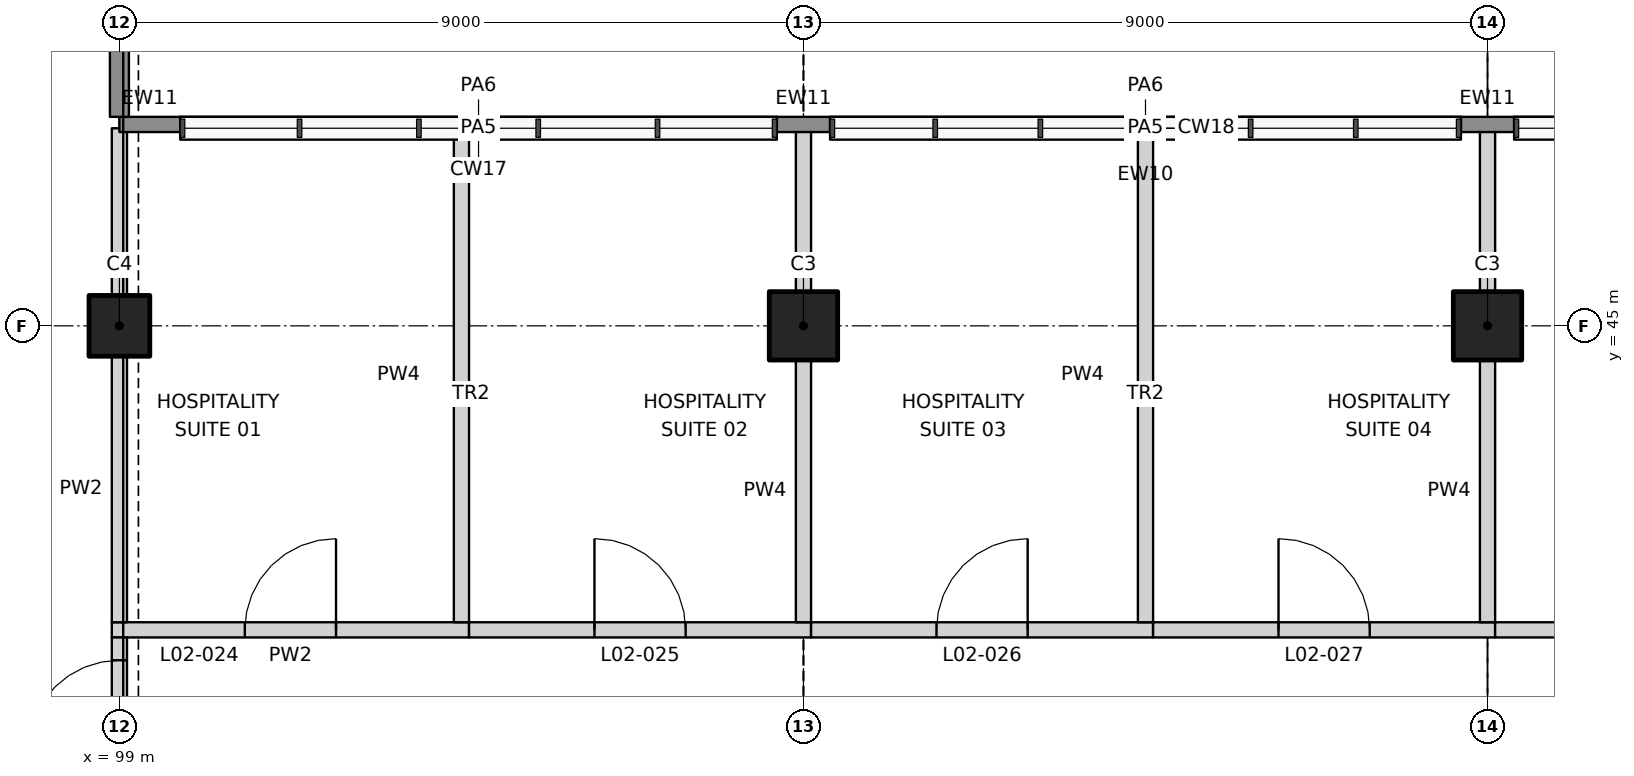
"""IFC4 building model, lengths in metres.
Left out: names, types, materials, properties, quantities, classifications, styles, units other than length and angle.
Written with IfcOpenShell. Run it as: python <this file> out.ifc"""

import sys

from ifc_helpers import new_model, si_unit, direction, frame, frame_2d, origin, origin_2d, place, context, subcontext, project, spatial, polyline, rectangle, outline, extrude, element, fill, save


model = new_model("IFC4")
c1 = context("Model", 3, precision=1e-05, world=origin(), true_north=direction((0.0, 1.0)))
c2 = subcontext(c1, "Body", "Model", "MODEL_VIEW")
j1 = project(units=[si_unit("LENGTHUNIT", "METRE"), si_unit("PLANEANGLEUNIT", "RADIAN")], contexts=[c1])
p1 = place(None, origin())
s1 = spatial("IfcSite", under=j1, at=p1, CompositionType="ELEMENT")
p2 = place(p1, origin())
s2 = spatial("IfcBuilding", under=s1, at=p2, CompositionType="ELEMENT")
p3 = place(p2, frame((0.0, 0.0, 11.5)))
s3 = spatial("IfcBuildingStorey", under=s2, at=p3, CompositionType="ELEMENT", Elevation=11.5)
p4 = place(p3, frame((99.0, 45.0, 0.0), z_axis=(0.0, 0.0, 1.0), x_axis=(1.0, 0.0, 0.0)))
e1 = element("IfcColumn", 1, at=p4, inside=s3, PredefinedType="COLUMN", context=c2, shape_type="SweptSolid", body=[
    extrude(rectangle(XDim=0.8, YDim=0.8, at=origin_2d()), origin(), (0.0, 0.0, 1.0), 10.5),
])
for number, where, z_axis, x_axis in (
    (2, (108.0, 45.0, 0.0), (0.0, 0.0, 1.0), (1.0, 0.0, 0.0)),
    (3, (117.0, 45.0, 0.0), (0.0, 0.0, 1.0), (1.0, 0.0, 0.0)),
):
    element("IfcColumn", number, at=place(p3, frame(where, z_axis=z_axis, x_axis=x_axis)), inside=s3, PredefinedType="COLUMN", context=c2, shape_type="SweptSolid", body=[
        extrude(rectangle(XDim=0.9, YDim=0.9, at=origin_2d()), origin(), (0.0, 0.0, 1.0), 4.506),
    ])
p5 = place(p3, frame((98.9, 41.0, 0.0), z_axis=(0.0, 0.0, 1.0), x_axis=(1.0, 0.0, 0.0)))
e4 = element("IfcWall", 4, at=p5, inside=s3, PredefinedType="PARTITIONING", context=c2, shape_type="SweptSolid", body=[
    extrude(outline(polyline([(0.0, 0.0), (4.7, 0.0), (4.7, 8.258), (0.47, 8.258), (0.0, 10.5), (0.0, 0.0)])), frame((0.0, 0.1, 0.0), z_axis=(0.0, -1.0, 0.0), x_axis=(1.0, 0.0, 0.0)), (0.0, 0.0, 1.0), 0.2),
])
p6 = place(p5, frame((1.75, 0.0, 0.0)))
e5 = element("IfcOpeningElement", 5, at=p6, cuts=e4, PredefinedType="OPENING", context=c2, shape_type="SweptSolid", body=[
    extrude(rectangle(XDim=1.2, YDim=2.1, at=frame_2d((0.6, 1.05))), frame((0.0, 0.11, 0.0), z_axis=(0.0, -1.0, 0.0), x_axis=(1.0, 0.0, 0.0)), (0.0, 0.0, 1.0), 0.22),
])
p7 = place(p3, frame((103.6, 41.0, 0.0), z_axis=(0.0, 0.0, 1.0), x_axis=(1.0, 0.0, 0.0)))
e6 = element("IfcWall", 6, at=p7, inside=s3, PredefinedType="PARTITIONING", context=c2, shape_type="SweptSolid", body=[
    extrude(rectangle(XDim=4.5, YDim=0.2, at=frame_2d((2.25, 0.0))), origin(), (0.0, 0.0, 1.0), 8.258),
])
p8 = place(p7, frame((1.65, 0.0, 0.0)))
e7 = element("IfcOpeningElement", 7, at=p8, cuts=e6, PredefinedType="OPENING", context=c2, shape_type="SweptSolid", body=[
    extrude(rectangle(XDim=1.2, YDim=2.1, at=frame_2d((0.6, 1.05))), frame((0.0, 0.11, 0.0), z_axis=(0.0, -1.0, 0.0), x_axis=(1.0, 0.0, 0.0)), (0.0, 0.0, 1.0), 0.22),
])
p9 = place(p3, frame((108.1, 41.0, 0.0), z_axis=(0.0, 0.0, 1.0), x_axis=(1.0, 0.0, 0.0)))
e8 = element("IfcWall", 8, at=p9, inside=s3, PredefinedType="PARTITIONING", context=c2, shape_type="SweptSolid", body=[
    extrude(rectangle(XDim=4.5, YDim=0.2, at=frame_2d((2.25, 0.0))), origin(), (0.0, 0.0, 1.0), 8.258),
])
p10 = place(p9, frame((1.65, 0.0, 0.0)))
e9 = element("IfcOpeningElement", 9, at=p10, cuts=e8, PredefinedType="OPENING", context=c2, shape_type="SweptSolid", body=[
    extrude(rectangle(XDim=1.2, YDim=2.1, at=frame_2d((0.6, 1.05))), frame((0.0, 0.11, 0.0), z_axis=(0.0, -1.0, 0.0), x_axis=(1.0, 0.0, 0.0)), (0.0, 0.0, 1.0), 0.22),
])
p11 = place(p3, frame((112.6, 41.0, 0.0), z_axis=(0.0, 0.0, 1.0), x_axis=(1.0, 0.0, 0.0)))
e10 = element("IfcWall", 10, at=p11, inside=s3, PredefinedType="PARTITIONING", context=c2, shape_type="SweptSolid", body=[
    extrude(rectangle(XDim=4.5, YDim=0.2, at=frame_2d((2.25, 0.0))), origin(), (0.0, 0.0, 1.0), 8.258),
])
p12 = place(p11, frame((1.65, 0.0, 0.0)))
e11 = element("IfcOpeningElement", 11, at=p12, cuts=e10, PredefinedType="OPENING", context=c2, shape_type="SweptSolid", body=[
    extrude(rectangle(XDim=1.2, YDim=2.1, at=frame_2d((0.6, 1.05))), frame((0.0, 0.11, 0.0), z_axis=(0.0, -1.0, 0.0), x_axis=(1.0, 0.0, 0.0)), (0.0, 0.0, 1.0), 0.22),
])
p13 = place(p3, frame((117.1, 41.0, 0.0), z_axis=(0.0, 0.0, 1.0), x_axis=(1.0, 0.0, 0.0)))
e12 = element("IfcWall", 12, at=p13, inside=s3, PredefinedType="PARTITIONING", context=c2, shape_type="SweptSolid", body=[
    extrude(rectangle(XDim=4.5, YDim=0.2, at=frame_2d((2.25, 0.0))), origin(), (0.0, 0.0, 1.0), 8.258),
])
p14 = place(p13, frame((1.65, 0.0, 0.0)))
e13 = element("IfcOpeningElement", 13, at=p14, cuts=e12, PredefinedType="OPENING", context=c2, shape_type="SweptSolid", body=[
    extrude(rectangle(XDim=1.2, YDim=2.1, at=frame_2d((0.6, 1.05))), frame((0.0, 0.11, 0.0), z_axis=(0.0, -1.0, 0.0), x_axis=(1.0, 0.0, 0.0)), (0.0, 0.0, 1.0), 0.22),
])
p15 = place(p3, frame((99.0, 39.1, 0.0), z_axis=(0.0, 0.0, 1.0), x_axis=(0.0, 1.0, 0.0)))
e14 = element("IfcWall", 14, at=p15, inside=s3, PredefinedType="PARTITIONING", context=c2, shape_type="SweptSolid", body=[
    extrude(rectangle(XDim=1.8, YDim=0.2, at=frame_2d((0.9, 0.0))), origin(), (0.0, 0.0, 1.0), 4.439),
])
p16 = place(p15, frame((0.3, 0.0, 0.0)))
e15 = element("IfcOpeningElement", 15, at=p16, cuts=e14, PredefinedType="OPENING", context=c2, shape_type="SweptSolid", body=[
    extrude(rectangle(XDim=1.2, YDim=2.1, at=frame_2d((0.6, 1.05))), frame((0.0, 0.11, 0.0), z_axis=(0.0, -1.0, 0.0), x_axis=(1.0, 0.0, 0.0)), (0.0, 0.0, 1.0), 0.22),
])
p17 = place(p3, frame((99.0, 41.1, 0.0), z_axis=(0.0, 0.0, 1.0), x_axis=(0.0, 1.0, 0.0)))
e16 = element("IfcWall", 16, at=p17, inside=s3, PredefinedType="PARTITIONING", context=c2, shape_type="SweptSolid", body=[
    extrude(rectangle(XDim=3.5, YDim=0.2, at=frame_2d((1.75, 0.0))), origin(), (0.0, 0.0, 1.0), 4.439),
])
p18 = place(p3, frame((99.0, 45.4, 0.0), z_axis=(0.0, 0.0, 1.0), x_axis=(0.0, 1.0, 0.0)))
e17 = element("IfcWall", 17, at=p18, inside=s3, PredefinedType="PARTITIONING", context=c2, shape_type="SweptSolid", body=[
    extrude(rectangle(XDim=2.2, YDim=0.2, at=frame_2d((1.1, 0.0))), origin(), (0.0, 0.0, 1.0), 2.877),
])
p19 = place(p3, frame((103.5, 41.1, 0.0), z_axis=(0.0, 0.0, 1.0), x_axis=(0.0, 1.0, 0.0)))
e18 = element("IfcWall", 18, at=p19, inside=s3, PredefinedType="PARTITIONING", context=c2, shape_type="SweptSolid", body=[
    extrude(outline(polyline([(0.0, 0.0), (6.5, 0.0), (6.5, 4.133), (0.0, 8.195), (0.0, 0.0)])), frame((0.0, 0.1, 0.0), z_axis=(0.0, -1.0, 0.0), x_axis=(1.0, 0.0, 0.0)), (0.0, 0.0, 1.0), 0.2),
])
p20 = place(p3, frame((108.0, 41.1, 0.0), z_axis=(0.0, 0.0, 1.0), x_axis=(0.0, 1.0, 0.0)))
e19 = element("IfcWall", 19, at=p20, inside=s3, PredefinedType="PARTITIONING", context=c2, shape_type="SweptSolid", body=[
    extrude(rectangle(XDim=3.45, YDim=0.2, at=frame_2d((1.725, 0.0))), origin(), (0.0, 0.0, 1.0), 4.439),
])
p21 = place(p3, frame((108.0, 45.45, 0.0), z_axis=(0.0, 0.0, 1.0), x_axis=(0.0, 1.0, 0.0)))
e20 = element("IfcWall", 20, at=p21, inside=s3, PredefinedType="PARTITIONING", context=c2, shape_type="SweptSolid", body=[
    extrude(outline(polyline([(0.0, 0.0), (2.15, 0.0), (2.15, 2.833), (2.079, 2.877), (0.0, 2.877), (0.0, 0.0)])), frame((0.0, 0.1, 0.0), z_axis=(0.0, -1.0, 0.0), x_axis=(1.0, 0.0, 0.0)), (0.0, 0.0, 1.0), 0.2),
])
p22 = place(p3, frame((112.5, 41.1, 0.0), z_axis=(0.0, 0.0, 1.0), x_axis=(0.0, 1.0, 0.0)))
e21 = element("IfcWall", 21, at=p22, inside=s3, PredefinedType="PARTITIONING", context=c2, shape_type="SweptSolid", body=[
    extrude(outline(polyline([(0.0, 0.0), (6.5, 0.0), (6.5, 4.133), (0.0, 8.195), (0.0, 0.0)])), frame((0.0, 0.1, 0.0), z_axis=(0.0, -1.0, 0.0), x_axis=(1.0, 0.0, 0.0)), (0.0, 0.0, 1.0), 0.2),
])
p23 = place(p3, frame((117.0, 41.1, 0.0), z_axis=(0.0, 0.0, 1.0), x_axis=(0.0, 1.0, 0.0)))
e22 = element("IfcWall", 22, at=p23, inside=s3, PredefinedType="PARTITIONING", context=c2, shape_type="SweptSolid", body=[
    extrude(rectangle(XDim=3.45, YDim=0.2, at=frame_2d((1.725, 0.0))), origin(), (0.0, 0.0, 1.0), 4.439),
])
p24 = place(p3, frame((117.0, 45.45, 0.0), z_axis=(0.0, 0.0, 1.0), x_axis=(0.0, 1.0, 0.0)))
e23 = element("IfcWall", 23, at=p24, inside=s3, PredefinedType="PARTITIONING", context=c2, shape_type="SweptSolid", body=[
    extrude(outline(polyline([(0.0, 0.0), (2.15, 0.0), (2.15, 2.833), (2.079, 2.877), (0.0, 2.877), (0.0, 0.0)])), frame((0.0, 0.1, 0.0), z_axis=(0.0, -1.0, 0.0), x_axis=(1.0, 0.0, 0.0)), (0.0, 0.0, 1.0), 0.2),
])
p25 = place(p3, frame((99.8, 47.65, 0.0), z_axis=(0.0, 0.0, 1.0), x_axis=(1.0, 0.0, 0.0)))
e24 = element("IfcWall", 24, at=p25, inside=s3, PredefinedType="SOLIDWALL", context=c2, shape_type="SweptSolid", body=[
    extrude(rectangle(XDim=7.85, YDim=0.2, at=frame_2d((3.925, 0.0))), origin(), (0.0, 0.0, 1.0), 1.1),
])
p26 = place(p3, frame((108.35, 47.65, 0.0), z_axis=(0.0, 0.0, 1.0), x_axis=(1.0, 0.0, 0.0)))
e25 = element("IfcWall", 25, at=p26, inside=s3, PredefinedType="SOLIDWALL", context=c2, shape_type="SweptSolid", body=[
    extrude(rectangle(XDim=8.3, YDim=0.2, at=frame_2d((4.15, 0.0))), origin(), (0.0, 0.0, 1.0), 1.1),
])
p27 = place(p3, frame((117.35, 47.65, 0.0), z_axis=(0.0, 0.0, 1.0), x_axis=(1.0, 0.0, 0.0)))
e26 = element("IfcWall", 26, at=p27, inside=s3, PredefinedType="SOLIDWALL", context=c2, shape_type="SweptSolid", body=[
    extrude(rectangle(XDim=6.85, YDim=0.2, at=frame_2d((3.425, 0.0))), origin(), (0.0, 0.0, 1.0), 1.1),
])
p28 = place(p3, frame((99.0, 47.65, 0.0), z_axis=(0.0, 0.0, 1.0), x_axis=(1.0, 0.0, 0.0)))
e27 = element("IfcWall", 27, at=p28, inside=s3, PredefinedType="SOLIDWALL", context=c2, shape_type="SweptSolid", body=[
    extrude(rectangle(XDim=0.8, YDim=0.2, at=frame_2d((0.4, 0.0))), origin(), (0.0, 0.0, 1.0), 4.034),
])
for number, where, z_axis, x_axis in (
    (28, (107.65, 47.65, 0.0), (0.0, 0.0, 1.0), (1.0, 0.0, 0.0)),
    (29, (116.65, 47.65, 0.0), (0.0, 0.0, 1.0), (1.0, 0.0, 0.0)),
):
    element("IfcWall", number, at=place(p3, frame(where, z_axis=z_axis, x_axis=x_axis)), inside=s3, PredefinedType="SOLIDWALL", context=c2, shape_type="SweptSolid", body=[
        extrude(rectangle(XDim=0.7, YDim=0.2, at=frame_2d((0.35, 0.0))), origin(), (0.0, 0.0, 1.0), 4.034),
    ])
p29 = place(p3, frame((99.0, 47.75, 0.0), z_axis=(0.0, 0.0, 1.0), x_axis=(0.0, 1.0, 0.0)))
e30 = element("IfcWall", 30, at=p29, inside=s3, PredefinedType="SOLIDWALL", context=c2, shape_type="SweptSolid", body=[
    extrude(rectangle(XDim=2.75, YDim=0.25, at=frame_2d((1.375, 0.0))), origin(), (0.0, 0.0, 1.0), 1.217),
])
p30 = place(p6, origin())
e31 = element("IfcDoor", 31, at=p30, inside=s3, OperationType="SINGLE_SWING_RIGHT", PredefinedType="DOOR", context=c2, shape_type="SweptSolid", body=[
    extrude(rectangle(XDim=1.2, YDim=2.1, at=frame_2d((0.6, 1.05))), frame((0.0, 0.025, 0.0), z_axis=(0.0, -1.0, 0.0), x_axis=(1.0, 0.0, 0.0)), (0.0, 0.0, 1.0), 0.05),
])
fill(e5, e31)
p31 = place(p8, origin())
e32 = element("IfcDoor", 32, at=p31, inside=s3, OperationType="SINGLE_SWING_LEFT", PredefinedType="DOOR", context=c2, shape_type="SweptSolid", body=[
    extrude(rectangle(XDim=1.2, YDim=2.1, at=frame_2d((0.6, 1.05))), frame((0.0, 0.025, 0.0), z_axis=(0.0, -1.0, 0.0), x_axis=(1.0, 0.0, 0.0)), (0.0, 0.0, 1.0), 0.05),
])
fill(e7, e32)
p32 = place(p10, origin())
e33 = element("IfcDoor", 33, at=p32, inside=s3, OperationType="SINGLE_SWING_RIGHT", PredefinedType="DOOR", context=c2, shape_type="SweptSolid", body=[
    extrude(rectangle(XDim=1.2, YDim=2.1, at=frame_2d((0.6, 1.05))), frame((0.0, 0.025, 0.0), z_axis=(0.0, -1.0, 0.0), x_axis=(1.0, 0.0, 0.0)), (0.0, 0.0, 1.0), 0.05),
])
fill(e9, e33)
p33 = place(p12, origin())
e34 = element("IfcDoor", 34, at=p33, inside=s3, OperationType="SINGLE_SWING_LEFT", PredefinedType="DOOR", context=c2, shape_type="SweptSolid", body=[
    extrude(rectangle(XDim=1.2, YDim=2.1, at=frame_2d((0.6, 1.05))), frame((0.0, 0.025, 0.0), z_axis=(0.0, -1.0, 0.0), x_axis=(1.0, 0.0, 0.0)), (0.0, 0.0, 1.0), 0.05),
])
fill(e11, e34)
p34 = place(p16, origin())
e35 = element("IfcDoor", 35, at=p34, inside=s3, OperationType="SINGLE_SWING_LEFT", PredefinedType="DOOR", context=c2, shape_type="SweptSolid", body=[
    extrude(rectangle(XDim=1.2, YDim=2.1, at=frame_2d((0.6, 1.05))), frame((0.0, 0.025, 0.0), z_axis=(0.0, -1.0, 0.0), x_axis=(1.0, 0.0, 0.0)), (0.0, 0.0, 1.0), 0.05),
])
fill(e15, e35)
save(model, sys.argv[1])
